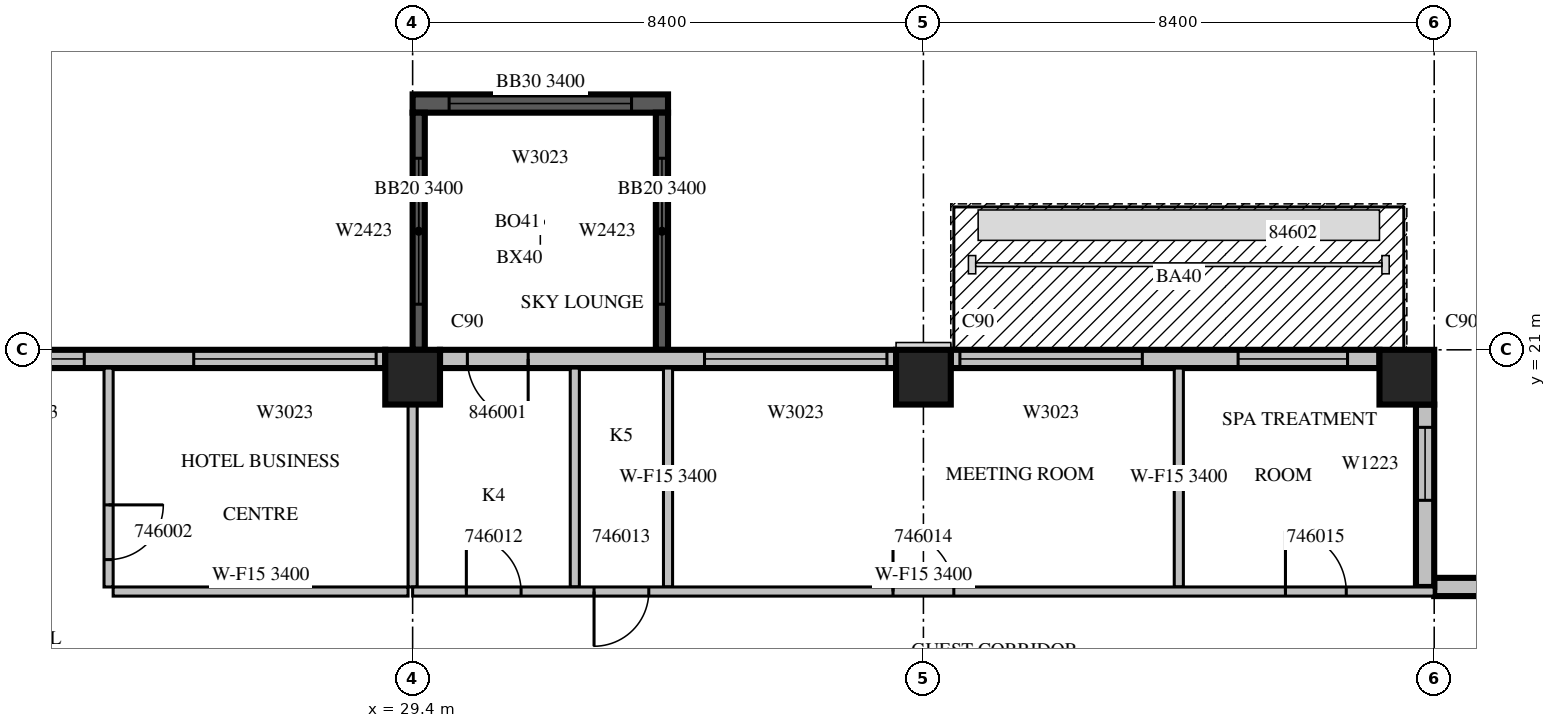
"""IFC4 building model, lengths in metres.
Left out: names, types, materials, properties, quantities, classifications, styles, units other than length and angle.
Written with IfcOpenShell. Run it as: python <this file> out.ifc"""

import sys

from ifc_helpers import new_model, si_unit, direction, frame, frame_2d, origin, origin_2d, place, context, subcontext, project, spatial, rectangle, extrude, source, transform, mapped, element, fill, save


model = new_model("IFC4")
c1 = context("Model", 3, precision=1e-05, world=origin(), true_north=direction((0.0, 1.0)))
c2 = subcontext(c1, "Body", "Model", "MODEL_VIEW")
j1 = project(units=[si_unit("LENGTHUNIT", "METRE"), si_unit("PLANEANGLEUNIT", "RADIAN")], contexts=[c1])
p1 = place(None, origin())
s1 = spatial("IfcSite", under=j1, at=p1, CompositionType="ELEMENT")
p2 = place(p1, origin())
s2 = spatial("IfcBuilding", under=s1, at=p2, CompositionType="ELEMENT")
p3 = place(p2, frame((0.0, 0.0, 208.2)))
s3 = spatial("IfcBuildingStorey", under=s2, at=p3, CompositionType="ELEMENT", Elevation=208.2)
m1 = source(origin(), c2, "Body", "SweptSolid", [
    extrude(rectangle(XDim=0.9, YDim=0.9, at=origin_2d()), origin(), (0.0, 0.0, 1.0), 3.8),
])
for number, where, z_axis, x_axis in (
    (1, (29.4, 20.55, 0.0), (0.0, 0.0, 1.0), (1.0, 0.0, 0.0)),
    (2, (37.8, 20.55, 0.0), (0.0, 0.0, 1.0), (1.0, 0.0, 0.0)),
    (3, (45.75, 20.55, 0.0), (0.0, 0.0, 1.0), (1.0, 0.0, 0.0)),
):
    element("IfcColumn", number, at=place(p3, frame(where, z_axis=z_axis, x_axis=x_axis)), inside=s3, PredefinedType="COLUMN", context=c2, shape_type="MappedRepresentation", body=[
        mapped(m1, transform((0.0, 0.0, 0.0), scale=1.0)),
    ])
m2 = source(origin(), c2, "Body", "SweptSolid", [
    extrude(rectangle(XDim=4.2, YDim=0.3, at=frame_2d((2.1, 0.0))), origin(), (0.0, 0.0, 1.0), 3.4),
])
p4 = place(p3, frame((33.6, 25.05, 0.0), z_axis=(0.0, 0.0, 1.0), x_axis=(-1.0, 0.0, 0.0)))
e4 = element("IfcWall", 4, at=p4, inside=s3, PredefinedType="SOLIDWALL", context=c2, shape_type="MappedRepresentation", body=[
    mapped(m2, transform((0.0, 0.0, 0.0), scale=1.0)),
])
m3 = source(origin(), c2, "Body", "SweptSolid", [
    extrude(rectangle(XDim=3.0, YDim=2.3, at=frame_2d((1.5, 1.15))), frame((0.0, 0.16, 0.0), z_axis=(0.0, -1.0, 0.0), x_axis=(1.0, 0.0, 0.0)), (0.0, 0.0, 1.0), 0.32),
])
p5 = place(p4, frame((0.6, 0.0, 0.6)))
e5 = element("IfcOpeningElement", 5, at=p5, cuts=e4, PredefinedType="OPENING", context=c2, shape_type="MappedRepresentation", body=[
    mapped(m3, transform((0.0, 0.0, 0.0), scale=1.0)),
])
m4 = source(origin(), c2, "Body", "SweptSolid", [
    extrude(rectangle(XDim=3.9, YDim=0.2, at=frame_2d((1.95, 0.0))), origin(), (0.0, 0.0, 1.0), 3.4),
])
p6 = place(p3, frame((33.5, 21.0, 0.0), z_axis=(0.0, 0.0, 1.0), x_axis=(0.0, 1.0, 0.0)))
e6 = element("IfcWall", 6, at=p6, inside=s3, PredefinedType="SOLIDWALL", context=c2, shape_type="MappedRepresentation", body=[
    mapped(m4, transform((0.0, 0.0, 0.0), scale=1.0)),
])
m5 = source(origin(), c2, "Body", "SweptSolid", [
    extrude(rectangle(XDim=2.4, YDim=2.3, at=frame_2d((1.2, 1.15))), frame((0.0, 0.11, 0.0), z_axis=(0.0, -1.0, 0.0), x_axis=(1.0, 0.0, 0.0)), (0.0, 0.0, 1.0), 0.22),
])
p7 = place(p6, frame((0.75, 0.0, 0.6)))
e7 = element("IfcOpeningElement", 7, at=p7, cuts=e6, PredefinedType="OPENING", context=c2, shape_type="MappedRepresentation", body=[
    mapped(m5, transform((0.0, 0.0, 0.0), scale=1.0)),
])
p8 = place(p3, frame((29.5, 21.0, 0.0), z_axis=(0.0, 0.0, 1.0), x_axis=(0.0, 1.0, 0.0)))
e8 = element("IfcWall", 8, at=p8, inside=s3, PredefinedType="SOLIDWALL", context=c2, shape_type="MappedRepresentation", body=[
    mapped(m4, transform((0.0, 0.0, 0.0), scale=1.0)),
])
p9 = place(p8, frame((0.75, 0.0, 0.6)))
e9 = element("IfcOpeningElement", 9, at=p9, cuts=e8, PredefinedType="OPENING", context=c2, shape_type="MappedRepresentation", body=[
    mapped(m5, transform((0.0, 0.0, 0.0), scale=1.0)),
])
m6 = source(origin(), c2, "Body", "SweptSolid", [
    extrude(rectangle(XDim=7.56, YDim=0.3, at=frame_2d((3.78, 0.0))), origin(), (0.0, 0.0, 1.0), 3.4),
])
p10 = place(p3, frame((53.76, 17.1, 0.0), z_axis=(0.0, 0.0, 1.0), x_axis=(-1.0, 0.0, 0.0)))
e10 = element("IfcWall", 10, at=p10, inside=s3, PredefinedType="STANDARD", context=c2, shape_type="MappedRepresentation", body=[
    mapped(m6, transform((0.0, 0.0, 0.0), scale=1.0)),
])
m7 = source(origin(), c2, "Body", "SweptSolid", [
    extrude(rectangle(XDim=3.6, YDim=2.3, at=frame_2d((1.8, 1.15))), frame((0.0, 0.16, 0.0), z_axis=(0.0, -1.0, 0.0), x_axis=(1.0, 0.0, 0.0)), (0.0, 0.0, 1.0), 0.32),
])
p11 = place(p10, frame((1.14, 0.0, 0.6)))
e11 = element("IfcOpeningElement", 11, at=p11, cuts=e10, PredefinedType="OPENING", context=c2, shape_type="MappedRepresentation", body=[
    mapped(m7, transform((0.0, 0.0, 0.0), scale=1.0)),
])
m8 = source(origin(), c2, "Body", "SweptSolid", [
    extrude(rectangle(XDim=3.0, YDim=0.3, at=frame_2d((1.5, 0.0))), origin(), (0.0, 0.0, 1.0), 3.4),
])
p12 = place(p3, frame((46.05, 17.1, 0.0), z_axis=(0.0, 0.0, 1.0), x_axis=(0.0, 1.0, 0.0)))
e12 = element("IfcWall", 12, at=p12, inside=s3, PredefinedType="STANDARD", context=c2, shape_type="MappedRepresentation", body=[
    mapped(m8, transform((0.0, 0.0, 0.0), scale=1.0)),
])
m9 = source(origin(), c2, "Body", "SweptSolid", [
    extrude(rectangle(XDim=1.2, YDim=2.3, at=frame_2d((0.6, 1.15))), frame((0.0, 0.16, 0.0), z_axis=(0.0, -1.0, 0.0), x_axis=(1.0, 0.0, 0.0)), (0.0, 0.0, 1.0), 0.32),
])
p13 = place(p12, frame((1.425, 0.0, 0.6)))
e13 = element("IfcOpeningElement", 13, at=p13, cuts=e12, PredefinedType="OPENING", context=c2, shape_type="MappedRepresentation", body=[
    mapped(m9, transform((0.0, 0.0, 0.0), scale=1.0)),
])
m10 = source(origin(), c2, "Body", "SweptSolid", [
    extrude(rectangle(XDim=7.05, YDim=0.3, at=frame_2d((3.525, 0.0))), origin(), (0.0, 0.0, 1.0), 3.4),
])
p14 = place(p3, frame((45.3, 20.85, 0.0), z_axis=(0.0, 0.0, 1.0), x_axis=(-1.0, 0.0, 0.0)))
e14 = element("IfcWall", 14, at=p14, inside=s3, PredefinedType="STANDARD", context=c2, shape_type="MappedRepresentation", body=[
    mapped(m10, transform((0.0, 0.0, 0.0), scale=1.0)),
])
m11 = source(origin(), c2, "Body", "SweptSolid", [
    extrude(rectangle(XDim=1.8, YDim=2.4, at=frame_2d((0.9, 1.2))), frame((0.0, 0.16, 0.0), z_axis=(0.0, -1.0, 0.0), x_axis=(1.0, 0.0, 0.0)), (0.0, 0.0, 1.0), 0.32),
])
p15 = place(p14, frame((0.525, 0.0, 0.0)))
e15 = element("IfcOpeningElement", 15, at=p15, cuts=e14, PredefinedType="OPENING", context=c2, shape_type="MappedRepresentation", body=[
    mapped(m11, transform((0.0, 0.0, 0.0), scale=1.0)),
])
p16 = place(p14, frame((3.9, 0.0, 0.6)))
e16 = element("IfcOpeningElement", 16, at=p16, cuts=e14, PredefinedType="OPENING", context=c2, shape_type="MappedRepresentation", body=[
    mapped(m3, transform((0.0, 0.0, 0.0), scale=1.0)),
])
m12 = source(origin(), c2, "Body", "SweptSolid", [
    extrude(rectangle(XDim=7.5, YDim=0.3, at=frame_2d((3.75, 0.0))), origin(), (0.0, 0.0, 1.0), 3.4),
])
p17 = place(p3, frame((37.35, 20.85, 0.0), z_axis=(0.0, 0.0, 1.0), x_axis=(-1.0, 0.0, 0.0)))
e17 = element("IfcWall", 17, at=p17, inside=s3, PredefinedType="STANDARD", context=c2, shape_type="MappedRepresentation", body=[
    mapped(m12, transform((0.0, 0.0, 0.0), scale=1.0)),
])
p18 = place(p17, frame((0.15, 0.0, 0.6)))
e18 = element("IfcOpeningElement", 18, at=p18, cuts=e17, PredefinedType="OPENING", context=c2, shape_type="MappedRepresentation", body=[
    mapped(m3, transform((0.0, 0.0, 0.0), scale=1.0)),
])
m13 = source(origin(), c2, "Body", "SweptSolid", [
    extrude(rectangle(XDim=1.0, YDim=2.1, at=frame_2d((0.5, 1.05))), frame((0.0, 0.16, 0.0), z_axis=(0.0, -1.0, 0.0), x_axis=(1.0, 0.0, 0.0)), (0.0, 0.0, 1.0), 0.32),
])
p19 = place(p17, frame((6.05, 0.0, 0.0)))
e19 = element("IfcOpeningElement", 19, at=p19, cuts=e17, PredefinedType="OPENING", context=c2, shape_type="MappedRepresentation", body=[
    mapped(m13, transform((0.0, 0.0, 0.0), scale=1.0)),
])
m14 = source(origin(), c2, "Body", "SweptSolid", [
    extrude(rectangle(XDim=7.15, YDim=0.3, at=frame_2d((3.575, 0.0))), origin(), (0.0, 0.0, 1.0), 3.4),
])
p20 = place(p3, frame((28.95, 20.85, 0.0), z_axis=(0.0, 0.0, 1.0), x_axis=(-1.0, 0.0, 0.0)))
e20 = element("IfcWall", 20, at=p20, inside=s3, PredefinedType="STANDARD", context=c2, shape_type="MappedRepresentation", body=[
    mapped(m14, transform((0.0, 0.0, 0.0), scale=1.0)),
])
p21 = place(p20, frame((0.15, 0.0, 0.6)))
e21 = element("IfcOpeningElement", 21, at=p21, cuts=e20, PredefinedType="OPENING", context=c2, shape_type="MappedRepresentation", body=[
    mapped(m3, transform((0.0, 0.0, 0.0), scale=1.0)),
])
m15 = source(origin(), c2, "Body", "SweptSolid", [
    extrude(rectangle(XDim=1.8, YDim=2.3, at=frame_2d((0.9, 1.15))), frame((0.0, 0.16, 0.0), z_axis=(0.0, -1.0, 0.0), x_axis=(1.0, 0.0, 0.0)), (0.0, 0.0, 1.0), 0.32),
])
p22 = place(p20, frame((4.95, 0.0, 0.6)))
e22 = element("IfcOpeningElement", 22, at=p22, cuts=e20, PredefinedType="OPENING", context=c2, shape_type="MappedRepresentation", body=[
    mapped(m15, transform((0.0, 0.0, 0.0), scale=1.0)),
])
m16 = source(origin(), c2, "Body", "SweptSolid", [
    extrude(rectangle(XDim=3.6, YDim=0.15, at=frame_2d((1.8, 0.0))), origin(), (0.0, 0.0, 1.0), 3.4),
])
p23 = place(p3, frame((24.4, 20.7, 0.0), z_axis=(0.0, 0.0, 1.0), x_axis=(0.0, -1.0, 0.0)))
e23 = element("IfcWall", 23, at=p23, inside=s3, PredefinedType="PARTITIONING", context=c2, shape_type="MappedRepresentation", body=[
    mapped(m16, transform((0.0, 0.0, 0.0), scale=1.0)),
])
m17 = source(origin(), c2, "Body", "SweptSolid", [
    extrude(rectangle(XDim=0.9, YDim=2.1, at=frame_2d((0.45, 1.05))), frame((0.0, 0.085, 0.0), z_axis=(0.0, -1.0, 0.0), x_axis=(1.0, 0.0, 0.0)), (0.0, 0.0, 1.0), 0.17),
])
p24 = place(p23, frame((2.25, 0.0, 0.0)))
e24 = element("IfcOpeningElement", 24, at=p24, cuts=e23, PredefinedType="OPENING", context=c2, shape_type="MappedRepresentation", body=[
    mapped(m17, transform((0.0, 0.0, 0.0), scale=1.0)),
])
m18 = source(origin(), c2, "Body", "SweptSolid", [
    extrude(rectangle(XDim=4.85, YDim=0.15, at=frame_2d((2.425, 0.0))), origin(), (0.0, 0.0, 1.0), 3.4),
])
p25 = place(p3, frame((24.475, 17.025, 0.0), z_axis=(0.0, 0.0, 1.0), x_axis=(1.0, 0.0, 0.0)))
e25 = element("IfcWall", 25, at=p25, inside=s3, PredefinedType="PARTITIONING", context=c2, shape_type="MappedRepresentation", body=[
    mapped(m18, transform((0.0, 0.0, 0.0), scale=1.0)),
])
m19 = source(origin(), c2, "Body", "SweptSolid", [
    extrude(rectangle(XDim=3.001, YDim=0.15, at=frame_2d((1.5, 0.0))), origin(), (0.0, 0.0, 1.0), 3.4),
])
p26 = place(p3, frame((29.4, 17.1, 0.0), z_axis=(0.0, 0.0, 1.0), x_axis=(0.0, 1.0, 0.0)))
e26 = element("IfcWall", 26, at=p26, inside=s3, PredefinedType="PARTITIONING", context=c2, shape_type="MappedRepresentation", body=[
    mapped(m19, transform((0.0, 0.0, 0.0), scale=1.0)),
])
for number, where, z_axis, x_axis in (
    (27, (32.067, 20.7, 0.0), (0.0, 0.0, 1.0), (0.0, -1.0, 0.0)),
    (28, (33.6, 17.1, 0.0), (0.0, 0.0, 1.0), (0.0, 1.0, 0.0)),
    (29, (42.0, 17.1, 0.0), (0.0, 0.0, 1.0), (0.0, 1.0, 0.0)),
):
    element("IfcWall", number, at=place(p3, frame(where, z_axis=z_axis, x_axis=x_axis)), inside=s3, PredefinedType="PARTITIONING", context=c2, shape_type="MappedRepresentation", body=[
        mapped(m16, transform((0.0, 0.0, 0.0), scale=1.0)),
    ])
m20 = source(origin(), c2, "Body", "SweptSolid", [
    extrude(rectangle(XDim=16.8, YDim=0.15, at=frame_2d((8.4, 0.0))), origin(), (0.0, 0.0, 1.0), 3.4),
])
p27 = place(p3, frame((29.4, 17.025, 0.0), z_axis=(0.0, 0.0, 1.0), x_axis=(1.0, 0.0, 0.0)))
e30 = element("IfcWall", 30, at=p27, inside=s3, PredefinedType="PARTITIONING", context=c2, shape_type="MappedRepresentation", body=[
    mapped(m20, transform((0.0, 0.0, 0.0), scale=1.0)),
])
p28 = place(p27, frame((0.883, 0.0, 0.0)))
e31 = element("IfcOpeningElement", 31, at=p28, cuts=e30, PredefinedType="OPENING", context=c2, shape_type="MappedRepresentation", body=[
    mapped(m17, transform((0.0, 0.0, 0.0), scale=1.0)),
])
p29 = place(p27, frame((2.983, 0.0, 0.0)))
e32 = element("IfcOpeningElement", 32, at=p29, cuts=e30, PredefinedType="OPENING", context=c2, shape_type="MappedRepresentation", body=[
    mapped(m17, transform((0.0, 0.0, 0.0), scale=1.0)),
])
m21 = source(origin(), c2, "Body", "SweptSolid", [
    extrude(rectangle(XDim=1.0, YDim=2.1, at=frame_2d((0.5, 1.05))), frame((0.0, 0.085, 0.0), z_axis=(0.0, -1.0, 0.0), x_axis=(1.0, 0.0, 0.0)), (0.0, 0.0, 1.0), 0.17),
])
p30 = place(p27, frame((7.9, 0.0, 0.0)))
e33 = element("IfcOpeningElement", 33, at=p30, cuts=e30, PredefinedType="OPENING", context=c2, shape_type="MappedRepresentation", body=[
    mapped(m21, transform((0.0, 0.0, 0.0), scale=1.0)),
])
p31 = place(p27, frame((14.354, 0.0, 0.0)))
e34 = element("IfcOpeningElement", 34, at=p31, cuts=e30, PredefinedType="OPENING", context=c2, shape_type="MappedRepresentation", body=[
    mapped(m21, transform((0.0, 0.0, 0.0), scale=1.0)),
])
m22 = source(origin(), c2, "Body", "SweptSolid", [
    extrude(rectangle(XDim=3.0, YDim=2.3, at=frame_2d((1.5, 1.15))), frame((0.0, 0.03, 0.0), z_axis=(0.0, -1.0, 0.0), x_axis=(1.0, 0.0, 0.0)), (0.0, 0.0, 1.0), 0.06),
])
p32 = place(p5, origin())
e35 = element("IfcWindow", 35, at=p32, inside=s3, PartitioningType="SINGLE_PANEL", PredefinedType="WINDOW", context=c2, shape_type="MappedRepresentation", body=[
    mapped(m22, transform((0.0, 0.0, 0.0), scale=1.0)),
])
fill(e5, e35)
m23 = source(origin(), c2, "Body", "SweptSolid", [
    extrude(rectangle(XDim=2.4, YDim=2.3, at=frame_2d((1.2, 1.15))), frame((0.0, 0.03, 0.0), z_axis=(0.0, -1.0, 0.0), x_axis=(1.0, 0.0, 0.0)), (0.0, 0.0, 1.0), 0.06),
])
p33 = place(p7, origin())
e36 = element("IfcWindow", 36, at=p33, inside=s3, PartitioningType="SINGLE_PANEL", PredefinedType="WINDOW", context=c2, shape_type="MappedRepresentation", body=[
    mapped(m23, transform((0.0, 0.0, 0.0), scale=1.0)),
])
fill(e7, e36)
p34 = place(p9, origin())
e37 = element("IfcWindow", 37, at=p34, inside=s3, PartitioningType="SINGLE_PANEL", PredefinedType="WINDOW", context=c2, shape_type="MappedRepresentation", body=[
    mapped(m23, transform((0.0, 0.0, 0.0), scale=1.0)),
])
fill(e9, e37)
m24 = source(origin(), c2, "Body", "SweptSolid", [
    extrude(rectangle(XDim=1.2, YDim=2.3, at=frame_2d((0.6, 1.15))), frame((0.0, 0.03, 0.0), z_axis=(0.0, -1.0, 0.0), x_axis=(1.0, 0.0, 0.0)), (0.0, 0.0, 1.0), 0.06),
])
p35 = place(p13, origin())
e38 = element("IfcWindow", 38, at=p35, inside=s3, PartitioningType="SINGLE_PANEL", PredefinedType="WINDOW", context=c2, shape_type="MappedRepresentation", body=[
    mapped(m24, transform((0.0, 0.0, 0.0), scale=1.0)),
])
fill(e13, e38)
m25 = source(origin(), c2, "Body", "SweptSolid", [
    extrude(rectangle(XDim=1.8, YDim=2.4, at=frame_2d((0.9, 1.2))), frame((0.0, 0.025, 0.0), z_axis=(0.0, -1.0, 0.0), x_axis=(1.0, 0.0, 0.0)), (0.0, 0.0, 1.0), 0.05),
])
p36 = place(p15, origin())
e39 = element("IfcDoor", 39, at=p36, inside=s3, OperationType="SLIDING_TO_LEFT", PredefinedType="DOOR", context=c2, shape_type="MappedRepresentation", body=[
    mapped(m25, transform((0.0, 0.0, 0.0), scale=1.0)),
])
fill(e15, e39)
p37 = place(p16, origin())
e40 = element("IfcWindow", 40, at=p37, inside=s3, PartitioningType="SINGLE_PANEL", PredefinedType="WINDOW", context=c2, shape_type="MappedRepresentation", body=[
    mapped(m22, transform((0.0, 0.0, 0.0), scale=1.0)),
])
fill(e16, e40)
p38 = place(p18, origin())
e41 = element("IfcWindow", 41, at=p38, inside=s3, PartitioningType="SINGLE_PANEL", PredefinedType="WINDOW", context=c2, shape_type="MappedRepresentation", body=[
    mapped(m22, transform((0.0, 0.0, 0.0), scale=1.0)),
])
fill(e18, e41)
p39 = place(p21, origin())
e42 = element("IfcWindow", 42, at=p39, inside=s3, PartitioningType="SINGLE_PANEL", PredefinedType="WINDOW", context=c2, shape_type="MappedRepresentation", body=[
    mapped(m22, transform((0.0, 0.0, 0.0), scale=1.0)),
])
fill(e21, e42)
m26 = source(origin(), c2, "Body", "SweptSolid", [
    extrude(rectangle(XDim=1.8, YDim=2.3, at=frame_2d((0.9, 1.15))), frame((0.0, 0.03, 0.0), z_axis=(0.0, -1.0, 0.0), x_axis=(1.0, 0.0, 0.0)), (0.0, 0.0, 1.0), 0.06),
])
p40 = place(p22, origin())
e43 = element("IfcWindow", 43, at=p40, inside=s3, PartitioningType="SINGLE_PANEL", PredefinedType="WINDOW", context=c2, shape_type="MappedRepresentation", body=[
    mapped(m26, transform((0.0, 0.0, 0.0), scale=1.0)),
])
fill(e22, e43)
m27 = source(origin(), c2, "Body", "SweptSolid", [
    extrude(rectangle(XDim=0.9, YDim=2.1, at=frame_2d((0.45, 1.05))), frame((0.0, 0.025, 0.0), z_axis=(0.0, -1.0, 0.0), x_axis=(1.0, 0.0, 0.0)), (0.0, 0.0, 1.0), 0.05),
])
p41 = place(p24, origin())
e44 = element("IfcDoor", 44, at=p41, inside=s3, OperationType="SINGLE_SWING_LEFT", PredefinedType="DOOR", context=c2, shape_type="MappedRepresentation", body=[
    mapped(m27, transform((0.0, 0.0, 0.0), scale=1.0)),
])
fill(e24, e44)
p42 = place(p28, origin())
e45 = element("IfcDoor", 45, at=p42, inside=s3, OperationType="SINGLE_SWING_LEFT", PredefinedType="DOOR", context=c2, shape_type="MappedRepresentation", body=[
    mapped(m27, transform((0.0, 0.0, 0.0), scale=1.0)),
])
fill(e31, e45)
p43 = place(p29, origin())
e46 = element("IfcDoor", 46, at=p43, inside=s3, OperationType="SINGLE_SWING_RIGHT", PredefinedType="DOOR", context=c2, shape_type="MappedRepresentation", body=[
    mapped(m27, transform((0.0, 0.0, 0.0), scale=1.0)),
])
fill(e32, e46)
m28 = source(origin(), c2, "Body", "SweptSolid", [
    extrude(rectangle(XDim=1.0, YDim=2.1, at=frame_2d((0.5, 1.05))), frame((0.0, 0.025, 0.0), z_axis=(0.0, -1.0, 0.0), x_axis=(1.0, 0.0, 0.0)), (0.0, 0.0, 1.0), 0.05),
])
p44 = place(p30, origin())
e47 = element("IfcDoor", 47, at=p44, inside=s3, OperationType="SINGLE_SWING_LEFT", PredefinedType="DOOR", context=c2, shape_type="MappedRepresentation", body=[
    mapped(m28, transform((0.0, 0.0, 0.0), scale=1.0)),
])
fill(e33, e47)
p45 = place(p31, origin())
e48 = element("IfcDoor", 48, at=p45, inside=s3, OperationType="SINGLE_SWING_LEFT", PredefinedType="DOOR", context=c2, shape_type="MappedRepresentation", body=[
    mapped(m28, transform((0.0, 0.0, 0.0), scale=1.0)),
])
fill(e34, e48)
p46 = place(p19, origin())
e49 = element("IfcDoor", 49, at=p46, inside=s3, OperationType="SINGLE_SWING_LEFT", PredefinedType="DOOR", context=c2, shape_type="MappedRepresentation", body=[
    mapped(m28, transform((0.0, 0.0, 0.0), scale=1.0)),
])
fill(e19, e49)
save(model, sys.argv[1])
